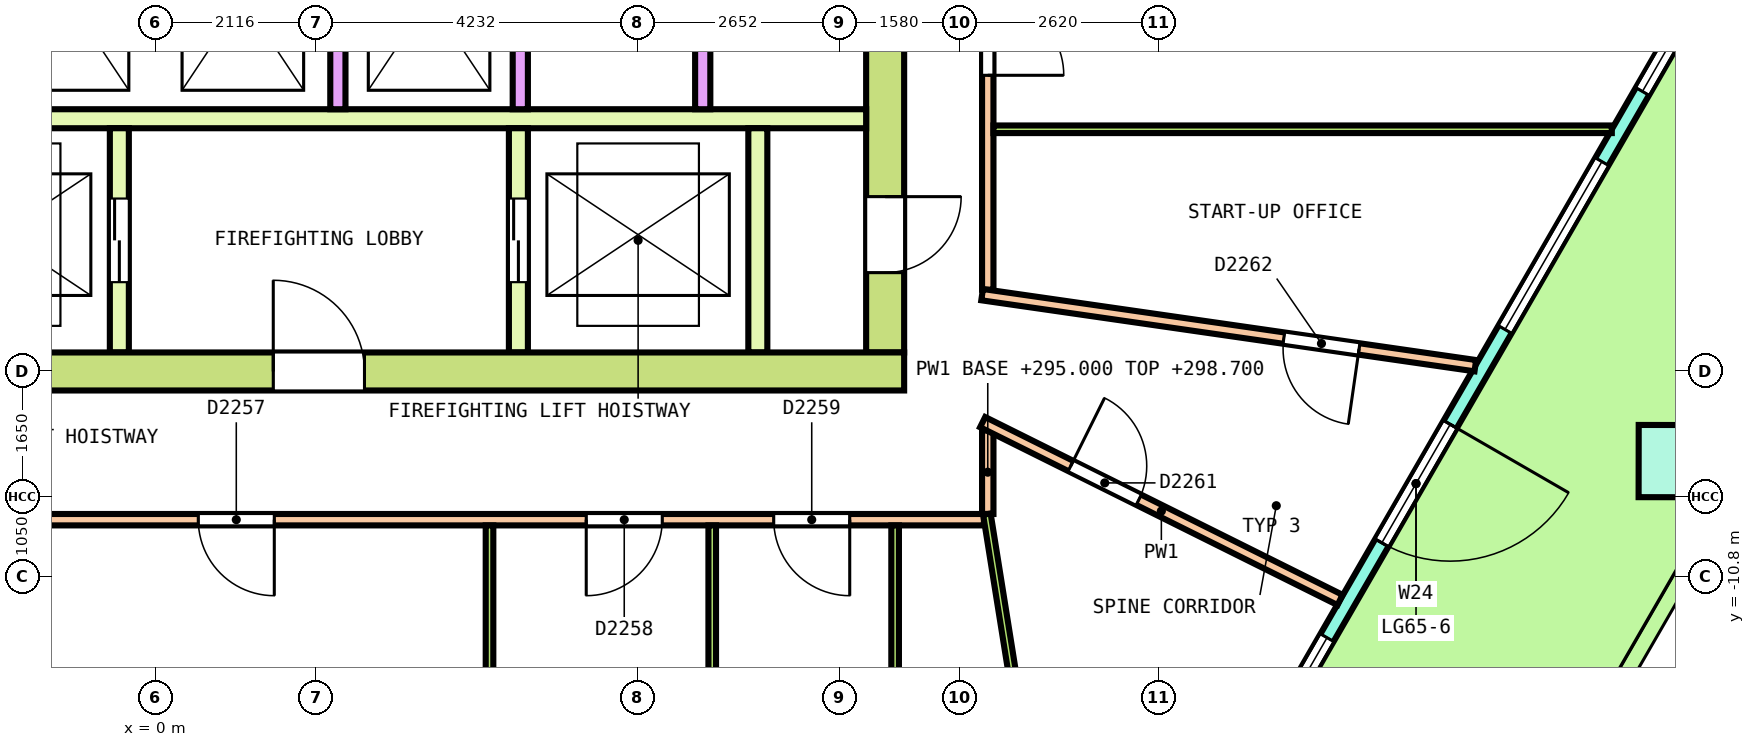
"""IFC4 building model, lengths in metres.
Left out: names, types, materials, properties, quantities, classifications, styles, units other than length and angle.
Written with IfcOpenShell. Run it as: python <this file> out.ifc"""

import sys

from ifc_helpers import new_model, si_unit, direction, frame, frame_2d, origin, origin_2d, place, context, subcontext, project, spatial, polyline, rectangle, outline, extrude, element, fill, save


model = new_model("IFC4")
c1 = context("Model", 3, precision=1e-05, world=origin(), true_north=direction((0.0, 1.0)))
c2 = subcontext(c1, "Body", "Model", "MODEL_VIEW")
j1 = project(units=[si_unit("LENGTHUNIT", "METRE"), si_unit("PLANEANGLEUNIT", "RADIAN")], contexts=[c1])
p1 = place(None, origin())
s1 = spatial("IfcSite", under=j1, at=p1, CompositionType="ELEMENT")
p2 = place(p1, origin())
s2 = spatial("IfcBuilding", under=s1, at=p2, CompositionType="ELEMENT")
p3 = place(p2, frame((0.0, 0.0, 295.0)))
s3 = spatial("IfcBuildingStorey", under=s2, at=p3, CompositionType="ELEMENT", Elevation=295.0)
p4 = place(p3, frame((19.988, -9.279, 0.0), z_axis=(0.003611945175, 0.00628746012, 0.999973710503), x_axis=(0.499382072477, 0.866351526517, -0.007251081967)))
e1 = element("IfcColumn", 1, at=p4, inside=s3, PredefinedType="COLUMN", context=c2, shape_type="SweptSolid", body=[
    extrude(rectangle(XDim=0.95, YDim=0.95, at=origin_2d()), origin(), (0.0, 0.0, 1.0), 3.65),
])
p5 = place(p3, frame((12.064, -17.404, 0.0), z_axis=(0.0, 0.0, 1.0), x_axis=(0.500012333517, 0.866018282908, 0.0)))
e2 = element("IfcWall", 2, at=p5, inside=s3, PredefinedType="SOLIDWALL", context=c2, shape_type="SweptSolid", body=[
    extrude(outline(polyline([(-0.027, -0.1), (0.98, -0.1), (1.988, -0.1), (2.995, -0.1), (4.003, -0.1), (5.01, -0.1), (6.018, -0.1), (7.025, -0.1), (8.033, -0.1), (9.04, -0.1), (10.047, -0.1), (11.055, -0.1), (12.062, -0.1), (13.07, -0.1), (14.077, -0.1), (15.085, -0.1), (16.092, -0.1), (17.1, -0.1), (18.107, -0.1), (18.053, 0.1), (17.052, 0.1), (16.05, 0.1), (15.049, 0.1), (14.047, 0.1), (13.046, 0.1), (12.044, 0.1), (11.043, 0.1), (10.042, 0.1), (9.04, 0.1), (8.039, 0.1), (7.037, 0.1), (6.036, 0.1), (5.034, 0.1), (4.033, 0.1), (3.031, 0.1), (2.03, 0.1), (1.028, 0.1), (0.027, 0.1), (-0.027, -0.1)])), origin(), (0.0, 0.0, 1.0), 3.7),
])
p6 = place(p5, frame((0.533, 0.0, 0.1)))
e3 = element("IfcOpeningElement", 3, at=p6, cuts=e2, PredefinedType="OPENING", context=c2, shape_type="SweptSolid", body=[
    extrude(rectangle(XDim=2.55, YDim=2.75, at=frame_2d((1.275, 1.375))), frame((0.0, 0.11, 0.0), z_axis=(0.0, -1.0, 0.0), x_axis=(1.0, 0.0, 0.0)), (0.0, 0.0, 1.0), 0.22),
])
p7 = place(p5, frame((4.149, 0.0, 0.1)))
e4 = element("IfcOpeningElement", 4, at=p7, cuts=e2, PredefinedType="OPENING", context=c2, shape_type="SweptSolid", body=[
    extrude(rectangle(XDim=2.55, YDim=2.75, at=frame_2d((1.275, 1.375))), frame((0.0, 0.11, 0.0), z_axis=(0.0, -1.0, 0.0), x_axis=(1.0, 0.0, 0.0)), (0.0, 0.0, 1.0), 0.22),
])
p8 = place(p5, frame((8.14, 0.0, 0.0)))
e5 = element("IfcOpeningElement", 5, at=p8, cuts=e2, PredefinedType="OPENING", context=c2, shape_type="SweptSolid", body=[
    extrude(rectangle(XDim=1.8, YDim=2.4, at=frame_2d((0.9, 1.2))), frame((0.0, 0.11, 0.0), z_axis=(0.0, -1.0, 0.0), x_axis=(1.0, 0.0, 0.0)), (0.0, 0.0, 1.0), 0.22),
])
p9 = place(p5, frame((8.14, 0.0, 2.55)))
e6 = element("IfcOpeningElement", 6, at=p9, cuts=e2, PredefinedType="OPENING", context=c2, shape_type="SweptSolid", body=[
    extrude(rectangle(XDim=1.8, YDim=0.3, at=frame_2d((0.9, 0.15))), frame((0.0, 0.11, 0.0), z_axis=(0.0, -1.0, 0.0), x_axis=(1.0, 0.0, 0.0)), (0.0, 0.0, 1.0), 0.22),
])
p10 = place(p5, frame((11.381, 0.0, 0.1)))
e7 = element("IfcOpeningElement", 7, at=p10, cuts=e2, PredefinedType="OPENING", context=c2, shape_type="SweptSolid", body=[
    extrude(rectangle(XDim=2.55, YDim=2.75, at=frame_2d((1.275, 1.375))), frame((0.0, 0.11, 0.0), z_axis=(0.0, -1.0, 0.0), x_axis=(1.0, 0.0, 0.0)), (0.0, 0.0, 1.0), 0.22),
])
p11 = place(p5, frame((14.997, 0.0, 0.1)))
e8 = element("IfcOpeningElement", 8, at=p11, cuts=e2, PredefinedType="OPENING", context=c2, shape_type="SweptSolid", body=[
    extrude(rectangle(XDim=2.55, YDim=2.75, at=frame_2d((1.275, 1.375))), frame((0.0, 0.11, 0.0), z_axis=(0.0, -1.0, 0.0), x_axis=(1.0, 0.0, 0.0)), (0.0, 0.0, 1.0), 0.22),
])
p12 = place(p3, frame((-9.85, -8.1, 0.0), z_axis=(0.0, 0.0, 1.0), x_axis=(1.0, 0.0, 0.0)))
e9 = element("IfcWall", 9, at=p12, inside=s3, PredefinedType="SHEAR", context=c2, shape_type="SweptSolid", body=[
    extrude(rectangle(XDim=19.7, YDim=0.5, at=frame_2d((9.85, 0.0))), origin(), (0.0, 0.0, 1.0), 3.7),
])
p13 = place(p12, frame((11.4, 0.0, 0.0)))
e10 = element("IfcOpeningElement", 10, at=p13, cuts=e9, PredefinedType="OPENING", context=c2, shape_type="SweptSolid", body=[
    extrude(rectangle(XDim=1.2, YDim=2.1, at=frame_2d((0.6, 1.05))), frame((0.0, 0.26, 0.0), z_axis=(0.0, -1.0, 0.0), x_axis=(1.0, 0.0, 0.0)), (0.0, 0.0, 1.0), 0.52),
])
p14 = place(p3, frame((9.6, -7.85, 0.0), z_axis=(0.0, 0.0, 1.0), x_axis=(0.0, 1.0, 0.0)))
e11 = element("IfcWall", 11, at=p14, inside=s3, PredefinedType="SHEAR", context=c2, shape_type="SweptSolid", body=[
    extrude(rectangle(XDim=15.7, YDim=0.5, at=frame_2d((7.85, 0.0))), origin(), (0.0, 0.0, 1.0), 3.7),
])
p15 = place(p14, frame((6.65, 0.0, 0.0)))
e12 = element("IfcOpeningElement", 12, at=p15, cuts=e11, PredefinedType="OPENING", context=c2, shape_type="SweptSolid", body=[
    extrude(rectangle(XDim=2.4, YDim=2.1, at=frame_2d((1.2, 1.05))), frame((0.0, 0.26, 0.0), z_axis=(0.0, -1.0, 0.0), x_axis=(1.0, 0.0, 0.0)), (0.0, 0.0, 1.0), 0.52),
])
p16 = place(p14, frame((13.55, 0.0, 0.0)))
e13 = element("IfcOpeningElement", 13, at=p16, cuts=e11, PredefinedType="OPENING", context=c2, shape_type="SweptSolid", body=[
    extrude(rectangle(XDim=1.2, YDim=2.1, at=frame_2d((0.6, 1.05))), frame((0.0, 0.26, 0.0), z_axis=(0.0, -1.0, 0.0), x_axis=(1.0, 0.0, 0.0)), (0.0, 0.0, 1.0), 0.52),
])
p17 = place(p14, frame((1.05, 0.0, 0.0)))
e14 = element("IfcOpeningElement", 14, at=p17, cuts=e11, PredefinedType="OPENING", context=c2, shape_type="SweptSolid", body=[
    extrude(rectangle(XDim=1.0, YDim=2.1, at=frame_2d((0.5, 1.05))), frame((0.0, 0.26, 0.0), z_axis=(0.0, -1.0, 0.0), x_axis=(1.0, 0.0, 0.0)), (0.0, 0.0, 1.0), 0.52),
])
p18 = place(p3, frame((-9.35, -4.775, 0.0), z_axis=(0.0, 0.0, 1.0), x_axis=(1.0, 0.0, 0.0)))
e15 = element("IfcWall", 15, at=p18, inside=s3, PredefinedType="SOLIDWALL", context=c2, shape_type="SweptSolid", body=[
    extrude(rectangle(XDim=18.7, YDim=0.25, at=frame_2d((9.35, 0.0))), origin(), (0.0, 0.0, 1.0), 3.7),
])
for number, where, z_axis, x_axis in (
    (16, (2.4, -4.65, 0.0), (0.0, 0.0, 1.0), (0.0, 1.0, 0.0)),
    (17, (4.8, -4.65, 0.0), (0.0, 0.0, 1.0), (0.0, 1.0, 0.0)),
    (18, (7.2, -4.65, 0.0), (0.0, 0.0, 1.0), (0.0, 1.0, 0.0)),
):
    element("IfcWall", number, at=place(p3, frame(where, z_axis=z_axis, x_axis=x_axis)), inside=s3, PredefinedType="SOLIDWALL", context=c2, shape_type="SweptSolid", body=[
        extrude(rectangle(XDim=2.9, YDim=0.2, at=frame_2d((1.45, 0.0))), origin(), (0.0, 0.0, 1.0), 3.7),
    ])
p19 = place(p3, frame((-0.475, -7.85, 0.0), z_axis=(0.0, 0.0, 1.0), x_axis=(0.0, 1.0, 0.0)))
e19 = element("IfcWall", 19, at=p19, inside=s3, PredefinedType="SOLIDWALL", context=c2, shape_type="SweptSolid", body=[
    extrude(rectangle(XDim=2.95, YDim=0.25, at=frame_2d((1.475, 0.0))), origin(), (0.0, 0.0, 1.0), 3.7),
])
p20 = place(p19, frame((0.925, 0.0, 0.0)))
e20 = element("IfcOpeningElement", 20, at=p20, cuts=e19, PredefinedType="OPENING", context=c2, shape_type="SweptSolid", body=[
    extrude(rectangle(XDim=1.1, YDim=2.1, at=frame_2d((0.55, 1.05))), frame((0.0, 0.135, 0.0), z_axis=(0.0, -1.0, 0.0), x_axis=(1.0, 0.0, 0.0)), (0.0, 0.0, 1.0), 0.27),
])
p21 = place(p3, frame((4.775, -7.85, 0.0), z_axis=(0.0, 0.0, 1.0), x_axis=(0.0, 1.0, 0.0)))
e21 = element("IfcWall", 21, at=p21, inside=s3, PredefinedType="SOLIDWALL", context=c2, shape_type="SweptSolid", body=[
    extrude(rectangle(XDim=2.95, YDim=0.25, at=frame_2d((1.475, 0.0))), origin(), (0.0, 0.0, 1.0), 3.7),
])
p22 = place(p21, frame((0.925, 0.0, 0.0)))
e22 = element("IfcOpeningElement", 22, at=p22, cuts=e21, PredefinedType="OPENING", context=c2, shape_type="SweptSolid", body=[
    extrude(rectangle(XDim=1.1, YDim=2.1, at=frame_2d((0.55, 1.05))), frame((0.0, 0.135, 0.0), z_axis=(0.0, -1.0, 0.0), x_axis=(1.0, 0.0, 0.0)), (0.0, 0.0, 1.0), 0.27),
])
p23 = place(p3, frame((7.925, -7.85, 0.0), z_axis=(0.0, 0.0, 1.0), x_axis=(0.0, 1.0, 0.0)))
e23 = element("IfcWall", 23, at=p23, inside=s3, PredefinedType="SOLIDWALL", context=c2, shape_type="SweptSolid", body=[
    extrude(rectangle(XDim=2.95, YDim=0.25, at=frame_2d((1.475, 0.0))), origin(), (0.0, 0.0, 1.0), 3.7),
])
p24 = place(p3, frame((10.95, -9.975, 0.0), z_axis=(0.0, 0.0, 1.0), x_axis=(0.0, 1.0, 0.0)))
e24 = element("IfcWall", 24, at=p24, inside=s3, PredefinedType="PARTITIONING", context=c2, shape_type="SweptSolid", body=[
    extrude(rectangle(XDim=1.1, YDim=0.15, at=frame_2d((0.55, 0.0))), origin(), (0.0, 0.0, 1.0), 3.7),
])
p25 = place(p3, frame((10.95, -7.025, 0.0), z_axis=(0.0, 0.0, 1.0), x_axis=(0.0, 1.0, 0.0)))
e25 = element("IfcWall", 25, at=p25, inside=s3, PredefinedType="PARTITIONING", context=c2, shape_type="SweptSolid", body=[
    extrude(rectangle(XDim=17.0, YDim=0.15, at=frame_2d((8.5, 0.0))), origin(), (0.0, 0.0, 1.0), 2.9),
])
p26 = place(p25, frame((8.758, 0.0, 0.0)))
e26 = element("IfcOpeningElement", 26, at=p26, cuts=e25, PredefinedType="OPENING", context=c2, shape_type="SweptSolid", body=[
    extrude(rectangle(XDim=1.0, YDim=2.1, at=frame_2d((0.5, 1.05))), frame((0.0, 0.085, 0.0), z_axis=(0.0, -1.0, 0.0), x_axis=(1.0, 0.0, 0.0)), (0.0, 0.0, 1.0), 0.17),
])
p27 = place(p25, frame((12.687, 0.0, 0.0)))
e27 = element("IfcOpeningElement", 27, at=p27, cuts=e25, PredefinedType="OPENING", context=c2, shape_type="SweptSolid", body=[
    extrude(rectangle(XDim=1.2, YDim=2.1, at=frame_2d((0.6, 1.05))), frame((0.0, 0.085, 0.0), z_axis=(0.0, -1.0, 0.0), x_axis=(1.0, 0.0, 0.0)), (0.0, 0.0, 1.0), 0.17),
])
p28 = place(p25, frame((2.822, 0.0, 0.0)))
e28 = element("IfcOpeningElement", 28, at=p28, cuts=e25, PredefinedType="OPENING", context=c2, shape_type="SweptSolid", body=[
    extrude(rectangle(XDim=1.0, YDim=2.1, at=frame_2d((0.5, 1.05))), frame((0.0, 0.085, 0.0), z_axis=(0.0, -1.0, 0.0), x_axis=(1.0, 0.0, 0.0)), (0.0, 0.0, 1.0), 0.17),
])
p29 = place(p25, frame((5.979, 0.0, 0.0)))
e29 = element("IfcOpeningElement", 29, at=p29, cuts=e25, PredefinedType="OPENING", context=c2, shape_type="SweptSolid", body=[
    extrude(rectangle(XDim=1.0, YDim=2.1, at=frame_2d((0.5, 1.05))), frame((0.0, 0.085, 0.0), z_axis=(0.0, -1.0, 0.0), x_axis=(1.0, 0.0, 0.0)), (0.0, 0.0, 1.0), 0.17),
])
p30 = place(p3, frame((-10.9, -10.05, 0.0), z_axis=(0.0, 0.0, 1.0), x_axis=(1.0, 0.0, 0.0)))
e30 = element("IfcWall", 30, at=p30, inside=s3, PredefinedType="PARTITIONING", context=c2, shape_type="SweptSolid", body=[
    extrude(rectangle(XDim=21.8, YDim=0.15, at=frame_2d((10.9, 0.0))), origin(), (0.0, 0.0, 1.0), 2.9),
])
p31 = place(p30, frame((3.791, 0.0, 0.0)))
e31 = element("IfcOpeningElement", 31, at=p31, cuts=e30, PredefinedType="OPENING", context=c2, shape_type="SweptSolid", body=[
    extrude(rectangle(XDim=1.2, YDim=2.1, at=frame_2d((0.6, 1.05))), frame((0.0, 0.085, 0.0), z_axis=(0.0, -1.0, 0.0), x_axis=(1.0, 0.0, 0.0)), (0.0, 0.0, 1.0), 0.17),
])
p32 = place(p30, frame((11.463, 0.0, 0.0)))
e32 = element("IfcOpeningElement", 32, at=p32, cuts=e30, PredefinedType="OPENING", context=c2, shape_type="SweptSolid", body=[
    extrude(rectangle(XDim=1.0, YDim=2.1, at=frame_2d((0.5, 1.05))), frame((0.0, 0.085, 0.0), z_axis=(0.0, -1.0, 0.0), x_axis=(1.0, 0.0, 0.0)), (0.0, 0.0, 1.0), 0.17),
])
p33 = place(p30, frame((16.567, 0.0, 0.0)))
e33 = element("IfcOpeningElement", 33, at=p33, cuts=e30, PredefinedType="OPENING", context=c2, shape_type="SweptSolid", body=[
    extrude(rectangle(XDim=1.0, YDim=2.1, at=frame_2d((0.5, 1.05))), frame((0.0, 0.085, 0.0), z_axis=(0.0, -1.0, 0.0), x_axis=(1.0, 0.0, 0.0)), (0.0, 0.0, 1.0), 0.17),
])
p34 = place(p30, frame((19.034, 0.0, 0.0)))
e34 = element("IfcOpeningElement", 34, at=p34, cuts=e30, PredefinedType="OPENING", context=c2, shape_type="SweptSolid", body=[
    extrude(rectangle(XDim=1.0, YDim=2.1, at=frame_2d((0.5, 1.05))), frame((0.0, 0.085, 0.0), z_axis=(0.0, -1.0, 0.0), x_axis=(1.0, 0.0, 0.0)), (0.0, 0.0, 1.0), 0.17),
])
p35 = place(p3, frame((10.883, -8.767, 0.0), z_axis=(0.0, 0.0, 1.0), x_axis=(0.895299399587, -0.445464908943, 0.0)))
e35 = element("IfcWall", 35, at=p35, inside=s3, PredefinedType="PARTITIONING", context=c2, shape_type="SweptSolid", body=[
    extrude(rectangle(XDim=5.252, YDim=0.15, at=frame_2d((2.626, 0.0))), origin(), (0.0, 0.0, 1.0), 2.9),
])
p36 = place(p35, frame((1.294, 0.0, 0.0)))
e36 = element("IfcOpeningElement", 36, at=p36, cuts=e35, PredefinedType="OPENING", context=c2, shape_type="SweptSolid", body=[
    extrude(rectangle(XDim=1.0, YDim=2.1, at=frame_2d((0.5, 1.05))), frame((0.0, 0.085, 0.0), z_axis=(0.0, -1.0, 0.0), x_axis=(1.0, 0.0, 0.0)), (0.0, 0.0, 1.0), 0.17),
])
p37 = place(p3, frame((10.876, -7.089, 0.0), z_axis=(0.0, 0.0, 1.0), x_axis=(0.989786471217, -0.142557852804, 0.0)))
e37 = element("IfcWall", 37, at=p37, inside=s3, PredefinedType="PARTITIONING", context=c2, shape_type="SweptSolid", body=[
    extrude(rectangle(XDim=6.556, YDim=0.15, at=frame_2d((3.278, 0.0))), origin(), (0.0, 0.0, 1.0), 2.9),
])
p38 = place(p37, frame((4.01, 0.0, 0.0)))
e38 = element("IfcOpeningElement", 38, at=p38, cuts=e37, PredefinedType="OPENING", context=c2, shape_type="SweptSolid", body=[
    extrude(rectangle(XDim=1.0, YDim=2.1, at=frame_2d((0.5, 1.05))), frame((0.0, 0.085, 0.0), z_axis=(0.0, -1.0, 0.0), x_axis=(1.0, 0.0, 0.0)), (0.0, 0.0, 1.0), 0.17),
])
p39 = place(p3, frame((11.025, -4.914, 0.0), z_axis=(0.0, 0.0, 1.0), x_axis=(1.0, 0.0, 0.0)))
e39 = element("IfcWall", 39, at=p39, inside=s3, PredefinedType="PARTITIONING", context=c2, shape_type="SweptSolid", body=[
    extrude(rectangle(XDim=8.135, YDim=0.1, at=frame_2d((4.068, 0.0))), origin(), (0.0, 0.0, 1.0), 2.9),
])
p40 = place(p3, frame((4.395, -20.056, 0.0), z_axis=(0.0, 0.0, 1.0), x_axis=(0.0, 1.0, 0.0)))
e40 = element("IfcWall", 40, at=p40, inside=s3, PredefinedType="PARTITIONING", context=c2, shape_type="SweptSolid", body=[
    extrude(rectangle(XDim=9.931, YDim=0.1, at=frame_2d((4.965, 0.0))), origin(), (0.0, 0.0, 1.0), 2.9),
])
p41 = place(p3, frame((7.325, -20.025, 0.0), z_axis=(0.0, 0.0, 1.0), x_axis=(0.0, 1.0, 0.0)))
e41 = element("IfcWall", 41, at=p41, inside=s3, PredefinedType="PARTITIONING", context=c2, shape_type="SweptSolid", body=[
    extrude(rectangle(XDim=9.9, YDim=0.1, at=frame_2d((4.95, 0.0))), origin(), (0.0, 0.0, 1.0), 2.9),
])
p42 = place(p3, frame((9.731, -18.635, 0.0), z_axis=(0.0, 0.0, 1.0), x_axis=(0.0, 1.0, 0.0)))
e42 = element("IfcWall", 42, at=p42, inside=s3, PredefinedType="PARTITIONING", context=c2, shape_type="SweptSolid", body=[
    extrude(rectangle(XDim=8.51, YDim=0.1, at=frame_2d((4.255, 0.0))), origin(), (0.0, 0.0, 1.0), 2.9),
])
p43 = place(p42, frame((2.071, 0.0, 0.0)))
e43 = element("IfcOpeningElement", 43, at=p43, cuts=e42, PredefinedType="OPENING", context=c2, shape_type="SweptSolid", body=[
    extrude(rectangle(XDim=1.0, YDim=2.1, at=frame_2d((0.5, 1.05))), frame((0.0, 0.06, 0.0), z_axis=(0.0, -1.0, 0.0), x_axis=(1.0, 0.0, 0.0)), (0.0, 0.0, 1.0), 0.12),
])
p44 = place(p3, frame((10.938, -9.976, 0.0), z_axis=(0.0, 0.0, 1.0), x_axis=(0.157868848491, -0.98746008865, 0.0)))
e44 = element("IfcWall", 44, at=p44, inside=s3, PredefinedType="PARTITIONING", context=c2, shape_type="SweptSolid", body=[
    extrude(rectangle(XDim=7.279, YDim=0.1, at=frame_2d((3.64, 0.0))), origin(), (0.0, 0.0, 1.0), 2.9),
])
p45 = place(p7, origin())
e45 = element("IfcWindow", 45, at=p45, inside=s3, PartitioningType="SINGLE_PANEL", PredefinedType="WINDOW", context=c2, shape_type="SweptSolid", body=[
    extrude(rectangle(XDim=2.55, YDim=2.75, at=frame_2d((1.275, 1.375))), frame((0.0, 0.03, 0.0), z_axis=(0.0, -1.0, 0.0), x_axis=(1.0, 0.0, 0.0)), (0.0, 0.0, 1.0), 0.06),
])
fill(e4, e45)
p46 = place(p8, origin())
e46 = element("IfcDoor", 46, at=p46, inside=s3, OperationType="DOUBLE_DOOR_SINGLE_SWING", PredefinedType="DOOR", context=c2, shape_type="SweptSolid", body=[
    extrude(rectangle(XDim=1.8, YDim=2.4, at=frame_2d((0.9, 1.2))), frame((0.0, 0.025, 0.0), z_axis=(0.0, -1.0, 0.0), x_axis=(1.0, 0.0, 0.0)), (0.0, 0.0, 1.0), 0.05),
])
fill(e5, e46)
p47 = place(p9, origin())
e47 = element("IfcWindow", 47, at=p47, inside=s3, PartitioningType="SINGLE_PANEL", PredefinedType="WINDOW", context=c2, shape_type="SweptSolid", body=[
    extrude(rectangle(XDim=1.8, YDim=0.3, at=frame_2d((0.9, 0.15))), frame((0.0, 0.03, 0.0), z_axis=(0.0, -1.0, 0.0), x_axis=(1.0, 0.0, 0.0)), (0.0, 0.0, 1.0), 0.06),
])
fill(e6, e47)
p48 = place(p10, origin())
e48 = element("IfcWindow", 48, at=p48, inside=s3, PartitioningType="SINGLE_PANEL", PredefinedType="WINDOW", context=c2, shape_type="SweptSolid", body=[
    extrude(rectangle(XDim=2.55, YDim=2.75, at=frame_2d((1.275, 1.375))), frame((0.0, 0.03, 0.0), z_axis=(0.0, -1.0, 0.0), x_axis=(1.0, 0.0, 0.0)), (0.0, 0.0, 1.0), 0.06),
])
fill(e7, e48)
p49 = place(p11, origin())
e49 = element("IfcWindow", 49, at=p49, inside=s3, PartitioningType="SINGLE_PANEL", PredefinedType="WINDOW", context=c2, shape_type="SweptSolid", body=[
    extrude(rectangle(XDim=2.55, YDim=2.75, at=frame_2d((1.275, 1.375))), frame((0.0, 0.03, 0.0), z_axis=(0.0, -1.0, 0.0), x_axis=(1.0, 0.0, 0.0)), (0.0, 0.0, 1.0), 0.06),
])
fill(e8, e49)
p50 = place(p20, origin())
e50 = element("IfcDoor", 50, at=p50, inside=s3, OperationType="DOUBLE_DOOR_SLIDING", PredefinedType="DOOR", context=c2, shape_type="SweptSolid", body=[
    extrude(rectangle(XDim=1.1, YDim=2.1, at=frame_2d((0.55, 1.05))), frame((0.0, 0.075, 0.0), z_axis=(0.0, -1.0, 0.0), x_axis=(1.0, 0.0, 0.0)), (0.0, 0.0, 1.0), 0.15),
])
fill(e20, e50)
p51 = place(p22, origin())
e51 = element("IfcDoor", 51, at=p51, inside=s3, OperationType="DOUBLE_DOOR_SLIDING", PredefinedType="DOOR", context=c2, shape_type="SweptSolid", body=[
    extrude(rectangle(XDim=1.1, YDim=2.1, at=frame_2d((0.55, 1.05))), frame((0.0, 0.075, 0.0), z_axis=(0.0, -1.0, 0.0), x_axis=(1.0, 0.0, 0.0)), (0.0, 0.0, 1.0), 0.15),
])
fill(e22, e51)
p52 = place(p13, origin())
e52 = element("IfcDoor", 52, at=p52, inside=s3, OperationType="SINGLE_SWING_LEFT", PredefinedType="DOOR", context=c2, shape_type="SweptSolid", body=[
    extrude(rectangle(XDim=1.2, YDim=2.1, at=frame_2d((0.6, 1.05))), frame((0.0, 0.2, 0.0), z_axis=(0.0, -1.0, 0.0), x_axis=(1.0, 0.0, 0.0)), (0.0, 0.0, 1.0), 0.4),
])
fill(e10, e52)
p53 = place(p17, origin())
e53 = element("IfcDoor", 53, at=p53, inside=s3, OperationType="SINGLE_SWING_LEFT", PredefinedType="DOOR", context=c2, shape_type="SweptSolid", body=[
    extrude(rectangle(XDim=1.0, YDim=2.1, at=frame_2d((0.5, 1.05))), frame((0.0, 0.2, 0.0), z_axis=(0.0, -1.0, 0.0), x_axis=(1.0, 0.0, 0.0)), (0.0, 0.0, 1.0), 0.4),
])
fill(e14, e53)
p54 = place(p32, origin())
e54 = element("IfcDoor", 54, at=p54, inside=s3, OperationType="SINGLE_SWING_LEFT", PredefinedType="DOOR", context=c2, shape_type="SweptSolid", body=[
    extrude(rectangle(XDim=1.0, YDim=2.1, at=frame_2d((0.5, 1.05))), frame((0.0, 0.025, 0.0), z_axis=(0.0, -1.0, 0.0), x_axis=(1.0, 0.0, 0.0)), (0.0, 0.0, 1.0), 0.05),
])
fill(e32, e54)
p55 = place(p33, origin())
e55 = element("IfcDoor", 55, at=p55, inside=s3, OperationType="SINGLE_SWING_LEFT", PredefinedType="DOOR", context=c2, shape_type="SweptSolid", body=[
    extrude(rectangle(XDim=1.0, YDim=2.1, at=frame_2d((0.5, 1.05))), frame((0.0, 0.025, 0.0), z_axis=(0.0, -1.0, 0.0), x_axis=(1.0, 0.0, 0.0)), (0.0, 0.0, 1.0), 0.05),
])
fill(e33, e55)
p56 = place(p34, origin())
e56 = element("IfcDoor", 56, at=p56, inside=s3, OperationType="SINGLE_SWING_RIGHT", PredefinedType="DOOR", context=c2, shape_type="SweptSolid", body=[
    extrude(rectangle(XDim=1.0, YDim=2.1, at=frame_2d((0.5, 1.05))), frame((0.0, 0.025, 0.0), z_axis=(0.0, -1.0, 0.0), x_axis=(1.0, 0.0, 0.0)), (0.0, 0.0, 1.0), 0.05),
])
fill(e34, e56)
p57 = place(p36, origin())
e57 = element("IfcDoor", 57, at=p57, inside=s3, OperationType="SINGLE_SWING_RIGHT", PredefinedType="DOOR", context=c2, shape_type="SweptSolid", body=[
    extrude(rectangle(XDim=1.0, YDim=2.1, at=frame_2d((0.5, 1.05))), frame((0.0, 0.025, 0.0), z_axis=(0.0, -1.0, 0.0), x_axis=(1.0, 0.0, 0.0)), (0.0, 0.0, 1.0), 0.05),
])
fill(e36, e57)
p58 = place(p38, origin())
e58 = element("IfcDoor", 58, at=p58, inside=s3, OperationType="SINGLE_SWING_LEFT", PredefinedType="DOOR", context=c2, shape_type="SweptSolid", body=[
    extrude(rectangle(XDim=1.0, YDim=2.1, at=frame_2d((0.5, 1.05))), frame((0.0, 0.025, 0.0), z_axis=(0.0, -1.0, 0.0), x_axis=(1.0, 0.0, 0.0)), (0.0, 0.0, 1.0), 0.05),
])
fill(e38, e58)
p59 = place(p28, origin())
e59 = element("IfcDoor", 59, at=p59, inside=s3, OperationType="SINGLE_SWING_RIGHT", PredefinedType="DOOR", context=c2, shape_type="SweptSolid", body=[
    extrude(rectangle(XDim=1.0, YDim=2.1, at=frame_2d((0.5, 1.05))), frame((0.0, 0.025, 0.0), z_axis=(0.0, -1.0, 0.0), x_axis=(1.0, 0.0, 0.0)), (0.0, 0.0, 1.0), 0.05),
])
fill(e28, e59)
save(model, sys.argv[1])
